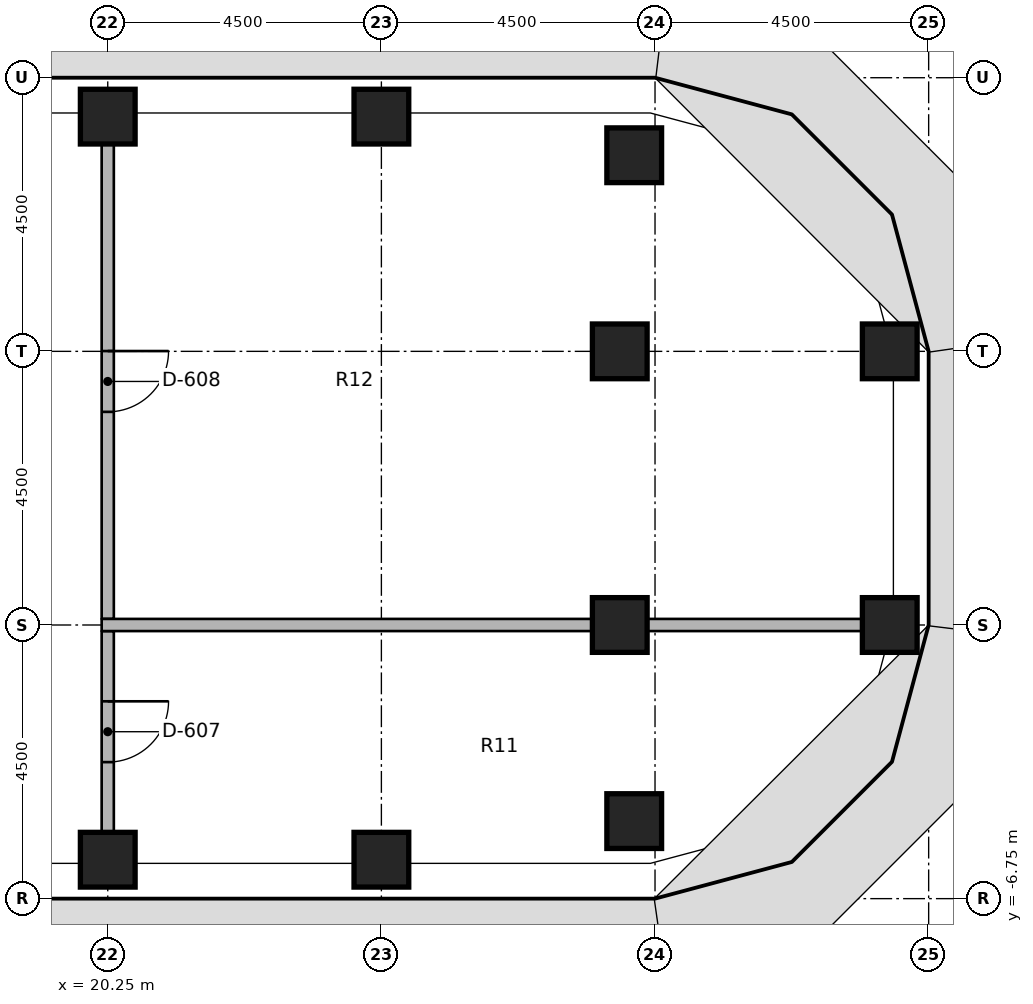
"""IFC4 building model, lengths in metres.
Left out: names, types, materials, properties, quantities, classifications, styles, units other than length and angle.
Written with IfcOpenShell. Run it as: python <this file> out.ifc"""

import sys

from ifc_helpers import new_model, si_unit, direction, frame, frame_2d, origin, origin_2d, place, context, subcontext, project, spatial, rectangle, extrude, element, fill, save


model = new_model("IFC4")
c1 = context("Model", 3, precision=1e-05, world=origin(), true_north=direction((0.0, 1.0)))
c2 = subcontext(c1, "Body", "Model", "MODEL_VIEW")
j1 = project(units=[si_unit("LENGTHUNIT", "METRE"), si_unit("PLANEANGLEUNIT", "RADIAN")], contexts=[c1])
p1 = place(None, origin())
s1 = spatial("IfcSite", under=j1, at=p1, CompositionType="ELEMENT")
p2 = place(p1, origin())
s2 = spatial("IfcBuilding", under=s1, at=p2, CompositionType="ELEMENT")
p3 = place(p2, frame((0.0, 0.0, 86.6)))
s3 = spatial("IfcBuildingStorey", under=s2, at=p3, CompositionType="ELEMENT", Elevation=86.6)
for number, where, z_axis, x_axis in (
    (1, (20.25, -6.11, 0.0), (0.0, 0.0, 1.0), (1.0, 0.0, 0.0)),
    (2, (20.25, 6.11, 0.0), (0.0, 0.0, 1.0), (1.0, 0.0, 0.0)),
    (3, (24.75, -6.11, 0.0), (0.0, 0.0, 1.0), (1.0, 0.0, 0.0)),
    (4, (24.75, 6.11, 0.0), (0.0, 0.0, 1.0), (1.0, 0.0, 0.0)),
    (5, (28.908, -5.475, 0.0), (0.0, 0.0, 1.0), (1.0, 0.0, 0.0)),
    (6, (28.67, -2.25, 0.0), (0.0, 0.0, 1.0), (1.0, 0.0, 0.0)),
    (7, (28.67, 2.25, 0.0), (0.0, 0.0, 1.0), (1.0, 0.0, 0.0)),
    (8, (28.908, 5.475, 0.0), (0.0, 0.0, 1.0), (1.0, 0.0, 0.0)),
    (9, (33.11, -2.25, 0.0), (0.0, 0.0, 1.0), (1.0, 0.0, 0.0)),
    (10, (33.11, 2.25, 0.0), (0.0, 0.0, 1.0), (1.0, 0.0, 0.0)),
):
    element("IfcColumn", number, at=place(p3, frame(where, z_axis=z_axis, x_axis=x_axis)), inside=s3, PredefinedType="COLUMN", context=c2, shape_type="SweptSolid", body=[
        extrude(rectangle(XDim=0.9, YDim=0.9, at=origin_2d()), origin(), (0.0, 0.0, 1.0), 3.65),
    ])
p4 = place(p3, frame((20.25, -2.35, 0.0), z_axis=(0.0, 0.0, 1.0), x_axis=(0.0, -1.0, 0.0)))
e11 = element("IfcWall", 11, at=p4, inside=s3, PredefinedType="PARTITIONING", context=c2, shape_type="SweptSolid", body=[
    extrude(rectangle(XDim=3.31, YDim=0.2, at=frame_2d((1.655, 0.0))), origin(), (0.0, 0.0, 1.0), 2.738),
])
p5 = place(p4, frame((1.155, 0.0, 0.0)))
e12 = element("IfcOpeningElement", 12, at=p5, cuts=e11, PredefinedType="OPENING", context=c2, shape_type="SweptSolid", body=[
    extrude(rectangle(XDim=1.0, YDim=2.1, at=frame_2d((0.5, 1.05))), frame((0.0, 0.11, 0.0), z_axis=(0.0, -1.0, 0.0), x_axis=(1.0, 0.0, 0.0)), (0.0, 0.0, 1.0), 0.22),
])
p6 = place(p3, frame((20.25, 5.66, 0.0), z_axis=(0.0, 0.0, 1.0), x_axis=(0.0, -1.0, 0.0)))
e13 = element("IfcWall", 13, at=p6, inside=s3, PredefinedType="PARTITIONING", context=c2, shape_type="SweptSolid", body=[
    extrude(rectangle(XDim=7.81, YDim=0.2, at=frame_2d((3.905, 0.0))), origin(), (0.0, 0.0, 1.0), 2.738),
])
p7 = place(p6, frame((3.405, 0.0, 0.0)))
e14 = element("IfcOpeningElement", 14, at=p7, cuts=e13, PredefinedType="OPENING", context=c2, shape_type="SweptSolid", body=[
    extrude(rectangle(XDim=1.0, YDim=2.1, at=frame_2d((0.5, 1.05))), frame((0.0, 0.11, 0.0), z_axis=(0.0, -1.0, 0.0), x_axis=(1.0, 0.0, 0.0)), (0.0, 0.0, 1.0), 0.22),
])
p8 = place(p3, frame((20.15, -2.25, 0.0), z_axis=(0.0, 0.0, 1.0), x_axis=(1.0, 0.0, 0.0)))
e15 = element("IfcWall", 15, at=p8, inside=s3, PredefinedType="PARTITIONING", context=c2, shape_type="SweptSolid", body=[
    extrude(rectangle(XDim=8.07, YDim=0.2, at=frame_2d((4.035, 0.0))), origin(), (0.0, 0.0, 1.0), 2.738),
])
p9 = place(p3, frame((29.12, -2.25, 0.0), z_axis=(0.0, 0.0, 1.0), x_axis=(1.0, 0.0, 0.0)))
e16 = element("IfcWall", 16, at=p9, inside=s3, PredefinedType="PARTITIONING", context=c2, shape_type="SweptSolid", body=[
    extrude(rectangle(XDim=3.54, YDim=0.2, at=frame_2d((1.77, 0.0))), origin(), (0.0, 0.0, 1.0), 2.738),
])
p10 = place(p5, origin())
e17 = element("IfcDoor", 17, at=p10, inside=s3, OperationType="SINGLE_SWING_LEFT", PredefinedType="DOOR", context=c2, shape_type="SweptSolid", body=[
    extrude(rectangle(XDim=1.0, YDim=2.1, at=frame_2d((0.5, 1.05))), frame((0.0, 0.025, 0.0), z_axis=(0.0, -1.0, 0.0), x_axis=(1.0, 0.0, 0.0)), (0.0, 0.0, 1.0), 0.05),
])
fill(e12, e17)
p11 = place(p7, origin())
e18 = element("IfcDoor", 18, at=p11, inside=s3, OperationType="SINGLE_SWING_RIGHT", PredefinedType="DOOR", context=c2, shape_type="SweptSolid", body=[
    extrude(rectangle(XDim=1.0, YDim=2.1, at=frame_2d((0.5, 1.05))), frame((0.0, 0.025, 0.0), z_axis=(0.0, -1.0, 0.0), x_axis=(1.0, 0.0, 0.0)), (0.0, 0.0, 1.0), 0.05),
])
fill(e14, e18)
save(model, sys.argv[1])
